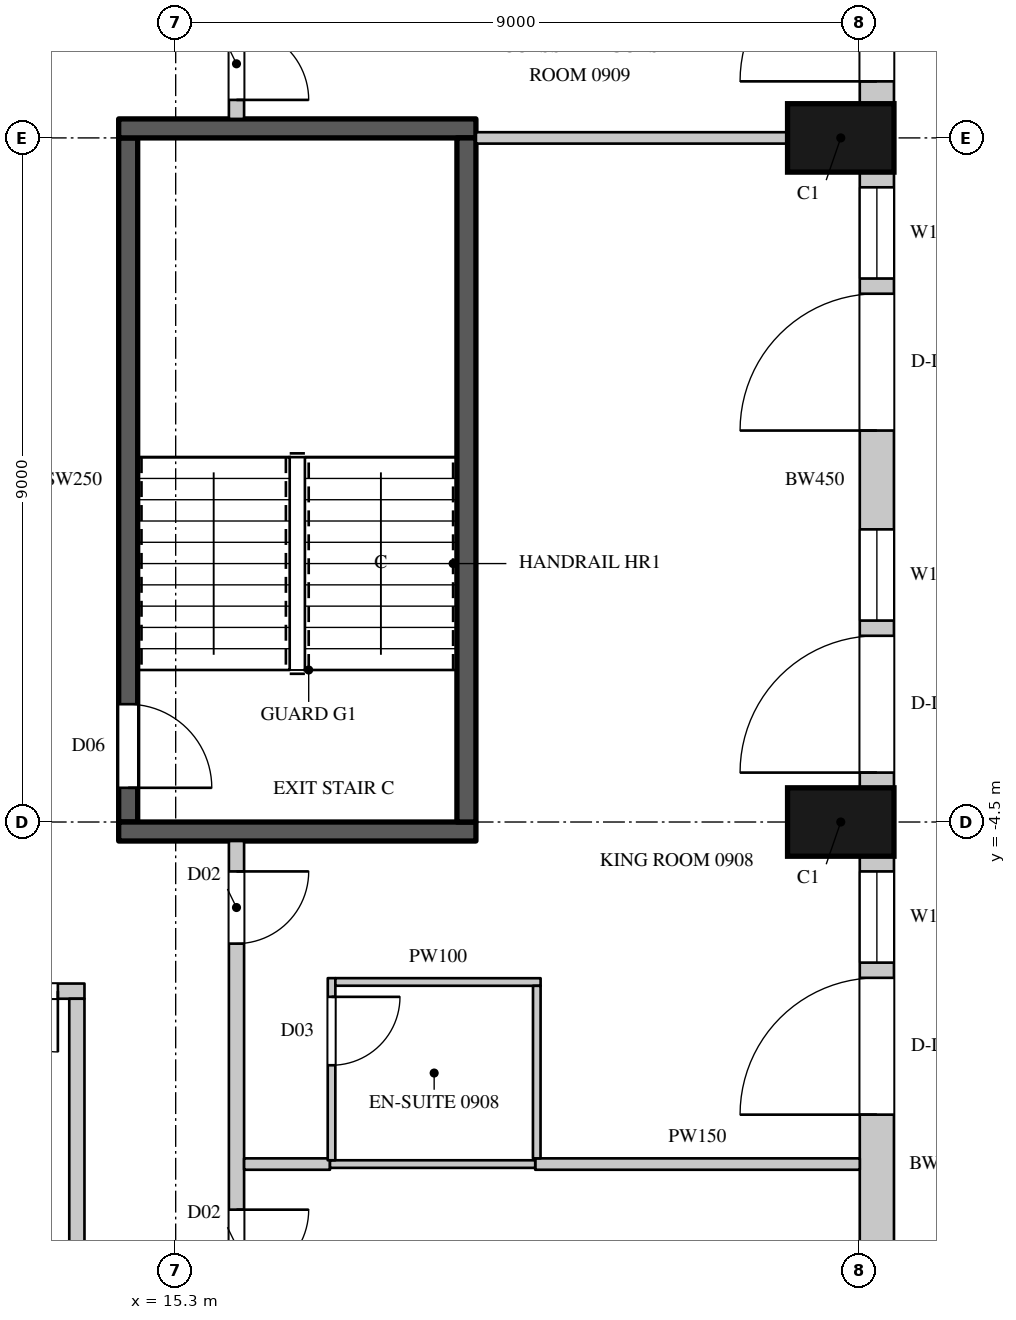
"""IFC4 building model, lengths in metres.
Left out: names, types, materials, properties, quantities, classifications, styles, units other than length and angle.
Written with IfcOpenShell. Run it as: python <this file> out.ifc"""

import sys

from ifc_helpers import new_model, si_unit, direction, frame, frame_2d, origin, origin_2d, place, context, subcontext, project, spatial, rectangle, extrude, element, fill, save


model = new_model("IFC4")
c1 = context("Model", 3, precision=1e-05, world=origin(), true_north=direction((0.0, 1.0)))
c2 = subcontext(c1, "Body", "Model", "MODEL_VIEW")
j1 = project(units=[si_unit("LENGTHUNIT", "METRE"), si_unit("PLANEANGLEUNIT", "RADIAN")], contexts=[c1])
p1 = place(None, origin())
s1 = spatial("IfcSite", under=j1, at=p1, CompositionType="ELEMENT")
p2 = place(p1, origin())
s2 = spatial("IfcBuilding", under=s1, at=p2, CompositionType="ELEMENT")
p3 = place(p2, frame((0.0, 0.0, 62.7)))
s3 = spatial("IfcBuildingStorey", under=s2, at=p3, CompositionType="ELEMENT", Elevation=62.7)
for number, where, z_axis, x_axis in (
    (1, (24.05, -4.5, 0.0), (0.0, 0.0, 1.0), (0.0, 1.0, 0.0)),
    (2, (24.05, 4.5, 0.0), (0.0, 0.0, 1.0), (0.0, 1.0, 0.0)),
):
    element("IfcColumn", number, at=place(p3, frame(where, z_axis=z_axis, x_axis=x_axis)), inside=s3, PredefinedType="COLUMN", context=c2, shape_type="SweptSolid", body=[
        extrude(rectangle(XDim=0.9, YDim=1.4, at=origin_2d()), origin(), (0.0, 0.0, 1.0), 3.6),
    ])
p4 = place(p3, frame((24.525, -13.05, 0.0), z_axis=(0.0, 0.0, 1.0), x_axis=(0.0, 1.0, 0.0)))
e3 = element("IfcWall", 3, at=p4, inside=s3, PredefinedType="SOLIDWALL", context=c2, shape_type="SweptSolid", body=[
    extrude(rectangle(XDim=8.1, YDim=0.45, at=frame_2d((4.05, 0.0))), origin(), (0.0, 0.0, 1.0), 3.3),
])
p5 = place(p4, frame((0.9, 0.0, 0.0)))
e4 = element("IfcOpeningElement", 4, at=p5, cuts=e3, PredefinedType="OPENING", context=c2, shape_type="SweptSolid", body=[
    extrude(rectangle(XDim=1.8, YDim=2.4, at=frame_2d((0.9, 1.2))), frame((0.0, 0.235, 0.0), z_axis=(0.0, -1.0, 0.0), x_axis=(1.0, 0.0, 0.0)), (0.0, 0.0, 1.0), 0.47),
])
p6 = place(p4, frame((4.7, 0.0, 0.0)))
e5 = element("IfcOpeningElement", 5, at=p6, cuts=e3, PredefinedType="OPENING", context=c2, shape_type="SweptSolid", body=[
    extrude(rectangle(XDim=1.8, YDim=2.4, at=frame_2d((0.9, 1.2))), frame((0.0, 0.235, 0.0), z_axis=(0.0, -1.0, 0.0), x_axis=(1.0, 0.0, 0.0)), (0.0, 0.0, 1.0), 0.47),
])
p7 = place(p4, frame((6.7, 0.0, 1.05)))
e6 = element("IfcOpeningElement", 6, at=p7, cuts=e3, PredefinedType="OPENING", context=c2, shape_type="SweptSolid", body=[
    extrude(rectangle(XDim=1.2, YDim=2.0, at=frame_2d((0.6, 1.0))), frame((0.0, 0.235, 0.0), z_axis=(0.0, -1.0, 0.0), x_axis=(1.0, 0.0, 0.0)), (0.0, 0.0, 1.0), 0.47),
])
p8 = place(p3, frame((24.525, -4.05, 0.0), z_axis=(0.0, 0.0, 1.0), x_axis=(0.0, 1.0, 0.0)))
e7 = element("IfcWall", 7, at=p8, inside=s3, PredefinedType="SOLIDWALL", context=c2, shape_type="SweptSolid", body=[
    extrude(rectangle(XDim=8.1, YDim=0.45, at=frame_2d((4.05, 0.0))), origin(), (0.0, 0.0, 1.0), 3.3),
])
p9 = place(p8, frame((0.2, 0.0, 0.0)))
e8 = element("IfcOpeningElement", 8, at=p9, cuts=e7, PredefinedType="OPENING", context=c2, shape_type="SweptSolid", body=[
    extrude(rectangle(XDim=1.8, YDim=2.4, at=frame_2d((0.9, 1.2))), frame((0.0, 0.235, 0.0), z_axis=(0.0, -1.0, 0.0), x_axis=(1.0, 0.0, 0.0)), (0.0, 0.0, 1.0), 0.47),
])
p10 = place(p8, frame((2.2, 0.0, 1.05)))
e9 = element("IfcOpeningElement", 9, at=p10, cuts=e7, PredefinedType="OPENING", context=c2, shape_type="SweptSolid", body=[
    extrude(rectangle(XDim=1.2, YDim=2.0, at=frame_2d((0.6, 1.0))), frame((0.0, 0.235, 0.0), z_axis=(0.0, -1.0, 0.0), x_axis=(1.0, 0.0, 0.0)), (0.0, 0.0, 1.0), 0.47),
])
p11 = place(p8, frame((4.7, 0.0, 0.0)))
e10 = element("IfcOpeningElement", 10, at=p11, cuts=e7, PredefinedType="OPENING", context=c2, shape_type="SweptSolid", body=[
    extrude(rectangle(XDim=1.8, YDim=2.4, at=frame_2d((0.9, 1.2))), frame((0.0, 0.235, 0.0), z_axis=(0.0, -1.0, 0.0), x_axis=(1.0, 0.0, 0.0)), (0.0, 0.0, 1.0), 0.47),
])
p12 = place(p8, frame((6.7, 0.0, 1.05)))
e11 = element("IfcOpeningElement", 11, at=p12, cuts=e7, PredefinedType="OPENING", context=c2, shape_type="SweptSolid", body=[
    extrude(rectangle(XDim=1.2, YDim=2.0, at=frame_2d((0.6, 1.0))), frame((0.0, 0.235, 0.0), z_axis=(0.0, -1.0, 0.0), x_axis=(1.0, 0.0, 0.0)), (0.0, 0.0, 1.0), 0.47),
])
p13 = place(p3, frame((24.525, 4.95, 0.0), z_axis=(0.0, 0.0, 1.0), x_axis=(0.0, 1.0, 0.0)))
e12 = element("IfcWall", 12, at=p13, inside=s3, PredefinedType="SOLIDWALL", context=c2, shape_type="SweptSolid", body=[
    extrude(rectangle(XDim=8.439, YDim=0.45, at=frame_2d((4.219, 0.0))), origin(), (0.0, 0.0, 1.0), 3.3),
])
p14 = place(p13, frame((0.294, 0.0, 0.0)))
e13 = element("IfcOpeningElement", 13, at=p14, cuts=e12, PredefinedType="OPENING", context=c2, shape_type="SweptSolid", body=[
    extrude(rectangle(XDim=1.8, YDim=2.4, at=frame_2d((0.9, 1.2))), frame((0.0, 0.235, 0.0), z_axis=(0.0, -1.0, 0.0), x_axis=(1.0, 0.0, 0.0)), (0.0, 0.0, 1.0), 0.47),
])
p15 = place(p13, frame((2.294, 0.0, 1.05)))
e14 = element("IfcOpeningElement", 14, at=p15, cuts=e12, PredefinedType="OPENING", context=c2, shape_type="SweptSolid", body=[
    extrude(rectangle(XDim=1.2, YDim=2.0, at=frame_2d((0.6, 1.0))), frame((0.0, 0.235, 0.0), z_axis=(0.0, -1.0, 0.0), x_axis=(1.0, 0.0, 0.0)), (0.0, 0.0, 1.0), 0.47),
])
p16 = place(p13, frame((5.232, 0.0, 1.05)))
e15 = element("IfcOpeningElement", 15, at=p16, cuts=e12, PredefinedType="OPENING", context=c2, shape_type="SweptSolid", body=[
    extrude(rectangle(XDim=2.7, YDim=2.0, at=frame_2d((1.35, 1.0))), frame((0.0, 0.235, 0.0), z_axis=(0.0, -1.0, 0.0), x_axis=(1.0, 0.0, 0.0)), (0.0, 0.0, 1.0), 0.47),
])
p17 = place(p3, frame((10.5, -6.725, 0.0), z_axis=(0.0, 0.0, 1.0), x_axis=(1.0, 0.0, 0.0)))
e16 = element("IfcWall", 16, at=p17, inside=s3, PredefinedType="PARTITIONING", context=c2, shape_type="SweptSolid", body=[
    extrude(rectangle(XDim=3.6, YDim=0.2, at=frame_2d((1.8, 0.0))), origin(), (0.0, 0.0, 1.0), 3.3),
])
p18 = place(p17, frame((1.65, 0.0, 0.0)))
e17 = element("IfcOpeningElement", 17, at=p18, cuts=e16, PredefinedType="OPENING", context=c2, shape_type="SweptSolid", body=[
    extrude(rectangle(XDim=1.6, YDim=2.4, at=frame_2d((0.8, 1.2))), frame((0.0, 0.11, 0.0), z_axis=(0.0, -1.0, 0.0), x_axis=(1.0, 0.0, 0.0)), (0.0, 0.0, 1.0), 0.22),
])
p19 = place(p3, frame((14.0, -15.3, 0.0), z_axis=(0.0, 0.0, 1.0), x_axis=(0.0, 1.0, 0.0)))
e18 = element("IfcWall", 18, at=p19, inside=s3, PredefinedType="PARTITIONING", context=c2, shape_type="SweptSolid", body=[
    extrude(rectangle(XDim=8.475, YDim=0.2, at=frame_2d((4.238, 0.0))), origin(), (0.0, 0.0, 1.0), 3.3),
])
p20 = place(p3, frame((16.1, -17.5, 0.0), z_axis=(0.0, 0.0, 1.0), x_axis=(0.0, 1.0, 0.0)))
e19 = element("IfcWall", 19, at=p20, inside=s3, PredefinedType="PARTITIONING", context=c2, shape_type="SweptSolid", body=[
    extrude(rectangle(XDim=12.75, YDim=0.2, at=frame_2d((6.375, 0.0))), origin(), (0.0, 0.0, 1.0), 3.3),
])
p21 = place(p20, frame((2.75, 0.0, 0.0)))
e20 = element("IfcOpeningElement", 20, at=p21, cuts=e19, PredefinedType="OPENING", context=c2, shape_type="SweptSolid", body=[
    extrude(rectangle(XDim=0.95, YDim=2.2, at=frame_2d((0.475, 1.1))), frame((0.0, 0.11, 0.0), z_axis=(0.0, -1.0, 0.0), x_axis=(1.0, 0.0, 0.0)), (0.0, 0.0, 1.0), 0.22),
])
p22 = place(p20, frame((6.95, 0.0, 0.0)))
e21 = element("IfcOpeningElement", 21, at=p22, cuts=e19, PredefinedType="OPENING", context=c2, shape_type="SweptSolid", body=[
    extrude(rectangle(XDim=0.95, YDim=2.2, at=frame_2d((0.475, 1.1))), frame((0.0, 0.11, 0.0), z_axis=(0.0, -1.0, 0.0), x_axis=(1.0, 0.0, 0.0)), (0.0, 0.0, 1.0), 0.22),
])
p23 = place(p20, frame((11.4, 0.0, 0.0)))
e22 = element("IfcOpeningElement", 22, at=p23, cuts=e19, PredefinedType="OPENING", context=c2, shape_type="SweptSolid", body=[
    extrude(rectangle(XDim=0.95, YDim=2.2, at=frame_2d((0.475, 1.1))), frame((0.0, 0.11, 0.0), z_axis=(0.0, -1.0, 0.0), x_axis=(1.0, 0.0, 0.0)), (0.0, 0.0, 1.0), 0.22),
])
p24 = place(p3, frame((16.1, 4.75, 0.0), z_axis=(0.0, 0.0, 1.0), x_axis=(0.0, 1.0, 0.0)))
e23 = element("IfcWall", 23, at=p24, inside=s3, PredefinedType="PARTITIONING", context=c2, shape_type="SweptSolid", body=[
    extrude(rectangle(XDim=12.65, YDim=0.2, at=frame_2d((6.325, 0.0))), origin(), (0.0, 0.0, 1.0), 3.3),
])
p25 = place(p24, frame((0.25, 0.0, 0.0)))
e24 = element("IfcOpeningElement", 24, at=p25, cuts=e23, PredefinedType="OPENING", context=c2, shape_type="SweptSolid", body=[
    extrude(rectangle(XDim=0.95, YDim=2.2, at=frame_2d((0.475, 1.1))), frame((0.0, 0.11, 0.0), z_axis=(0.0, -1.0, 0.0), x_axis=(1.0, 0.0, 0.0)), (0.0, 0.0, 1.0), 0.22),
])
p26 = place(p24, frame((6.9, 0.0, 0.0)))
e25 = element("IfcOpeningElement", 25, at=p26, cuts=e23, PredefinedType="OPENING", context=c2, shape_type="SweptSolid", body=[
    extrude(rectangle(XDim=0.95, YDim=2.2, at=frame_2d((0.475, 1.1))), frame((0.0, 0.11, 0.0), z_axis=(0.0, -1.0, 0.0), x_axis=(1.0, 0.0, 0.0)), (0.0, 0.0, 1.0), 0.22),
])
p27 = place(p3, frame((16.2, -9.0, 0.0), z_axis=(0.0, 0.0, 1.0), x_axis=(1.0, 0.0, 0.0)))
e26 = element("IfcWall", 26, at=p27, inside=s3, PredefinedType="PARTITIONING", context=c2, shape_type="SweptSolid", body=[
    extrude(rectangle(XDim=1.13, YDim=0.15, at=frame_2d((0.565, 0.0))), origin(), (0.0, 0.0, 1.0), 2.65),
])
p28 = place(p3, frame((19.25, 4.5, 0.0), z_axis=(0.0, 0.0, 1.0), x_axis=(1.0, 0.0, 0.0)))
e27 = element("IfcWall", 27, at=p28, inside=s3, PredefinedType="PARTITIONING", context=c2, shape_type="SweptSolid", body=[
    extrude(rectangle(XDim=4.1, YDim=0.15, at=frame_2d((2.05, 0.0))), origin(), (0.0, 0.0, 1.0), 3.3),
])
p29 = place(p3, frame((20.03, -9.0, 0.0), z_axis=(0.0, 0.0, 1.0), x_axis=(1.0, 0.0, 0.0)))
e28 = element("IfcWall", 28, at=p29, inside=s3, PredefinedType="PARTITIONING", context=c2, shape_type="SweptSolid", body=[
    extrude(rectangle(XDim=4.27, YDim=0.15, at=frame_2d((2.135, 0.0))), origin(), (0.0, 0.0, 1.0), 2.65),
])
p30 = place(p3, frame((14.675, -4.5, 0.0), z_axis=(0.0, 0.0, 1.0), x_axis=(0.0, 1.0, 0.0)))
e29 = element("IfcWall", 29, at=p30, inside=s3, PredefinedType="SHEAR", context=c2, shape_type="SweptSolid", body=[
    extrude(rectangle(XDim=9.0, YDim=0.25, at=frame_2d((4.5, 0.0))), origin(), (0.0, 0.0, 1.0), 3.3),
])
p31 = place(p30, frame((0.45, 0.0, 0.0)))
e30 = element("IfcOpeningElement", 30, at=p31, cuts=e29, PredefinedType="OPENING", context=c2, shape_type="SweptSolid", body=[
    extrude(rectangle(XDim=1.1, YDim=2.2, at=frame_2d((0.55, 1.1))), frame((0.0, 0.135, 0.0), z_axis=(0.0, -1.0, 0.0), x_axis=(1.0, 0.0, 0.0)), (0.0, 0.0, 1.0), 0.27),
])
for number, where, z_axis, x_axis in (
    (31, (14.55, -4.625, 0.0), (0.0, 0.0, 1.0), (1.0, 0.0, 0.0)),
    (32, (14.55, 4.625, 0.0), (0.0, 0.0, 1.0), (1.0, 0.0, 0.0)),
):
    element("IfcWall", number, at=place(p3, frame(where, z_axis=z_axis, x_axis=x_axis)), inside=s3, PredefinedType="SHEAR", context=c2, shape_type="SweptSolid", body=[
        extrude(rectangle(XDim=4.7, YDim=0.25, at=frame_2d((2.35, 0.0))), origin(), (0.0, 0.0, 1.0), 3.3),
    ])
p32 = place(p3, frame((19.125, -4.5, 0.0), z_axis=(0.0, 0.0, 1.0), x_axis=(0.0, 1.0, 0.0)))
e33 = element("IfcWall", 33, at=p32, inside=s3, PredefinedType="SHEAR", context=c2, shape_type="SweptSolid", body=[
    extrude(rectangle(XDim=9.0, YDim=0.25, at=frame_2d((4.5, 0.0))), origin(), (0.0, 0.0, 1.0), 3.3),
])
p33 = place(p3, frame((17.33, -9.0, 0.0), z_axis=(0.0, 0.0, 1.0), x_axis=(1.0, 0.0, 0.0)))
e34 = element("IfcWall", 34, at=p33, inside=s3, PredefinedType="PARTITIONING", context=c2, shape_type="SweptSolid", body=[
    extrude(rectangle(XDim=2.7, YDim=0.1, at=frame_2d((1.35, 0.0))), origin(), (0.0, 0.0, 1.0), 2.65),
])
p34 = place(p3, frame((17.35, -8.95, 0.0), z_axis=(0.0, 0.0, 1.0), x_axis=(0.000407580973, 0.999999916939, 0.0)))
e35 = element("IfcWall", 35, at=p34, inside=s3, PredefinedType="PARTITIONING", context=c2, shape_type="SweptSolid", body=[
    extrude(rectangle(XDim=2.396, YDim=0.1, at=frame_2d((1.198, 0.0))), origin(), (0.0, 0.0, 1.0), 3.3),
])
p35 = place(p34, frame((1.25, 0.0, 0.0)))
e36 = element("IfcOpeningElement", 36, at=p35, cuts=e35, PredefinedType="OPENING", context=c2, shape_type="SweptSolid", body=[
    extrude(rectangle(XDim=0.9, YDim=2.2, at=frame_2d((0.45, 1.1))), frame((0.0, 0.06, 0.0), z_axis=(0.0, -1.0, 0.0), x_axis=(1.0, 0.0, 0.0)), (0.0, 0.0, 1.0), 0.12),
])
p36 = place(p3, frame((17.401, -6.604, 0.0), z_axis=(0.0, 0.0, 1.0), x_axis=(0.9999999346, -0.000361663629, 0.0)))
e37 = element("IfcWall", 37, at=p36, inside=s3, PredefinedType="PARTITIONING", context=c2, shape_type="SweptSolid", body=[
    extrude(rectangle(XDim=2.7, YDim=0.1, at=frame_2d((1.35, 0.0))), origin(), (0.0, 0.0, 1.0), 3.3),
])
p37 = place(p3, frame((20.05, -8.925, 0.0), z_axis=(0.0, 0.0, 1.0), x_axis=(0.000430200003, 0.999999907464, 0.0)))
e38 = element("IfcWall", 38, at=p37, inside=s3, PredefinedType="PARTITIONING", context=c2, shape_type="SweptSolid", body=[
    extrude(rectangle(XDim=2.27, YDim=0.1, at=frame_2d((1.135, 0.0))), origin(), (0.0, 0.0, 1.0), 3.3),
])
p38 = place(p6, origin())
e39 = element("IfcDoor", 39, at=p38, inside=s3, OperationType="SLIDING_TO_LEFT", PredefinedType="DOOR", context=c2, shape_type="SweptSolid", body=[
    extrude(rectangle(XDim=1.8, YDim=2.4, at=frame_2d((0.9, 1.2))), frame((0.0, 0.13, 0.0), z_axis=(0.0, -1.0, 0.0), x_axis=(1.0, 0.0, 0.0)), (0.0, 0.0, 1.0), 0.05),
])
fill(e5, e39)
p39 = place(p7, origin())
e40 = element("IfcWindow", 40, at=p39, inside=s3, PartitioningType="SINGLE_PANEL", PredefinedType="WINDOW", context=c2, shape_type="SweptSolid", body=[
    extrude(rectangle(XDim=1.2, YDim=2.0, at=frame_2d((0.6, 1.0))), frame((0.0, 0.135, 0.0), z_axis=(0.0, -1.0, 0.0), x_axis=(1.0, 0.0, 0.0)), (0.0, 0.0, 1.0), 0.06),
])
fill(e6, e40)
p40 = place(p9, origin())
e41 = element("IfcDoor", 41, at=p40, inside=s3, OperationType="SLIDING_TO_LEFT", PredefinedType="DOOR", context=c2, shape_type="SweptSolid", body=[
    extrude(rectangle(XDim=1.8, YDim=2.4, at=frame_2d((0.9, 1.2))), frame((0.0, 0.13, 0.0), z_axis=(0.0, -1.0, 0.0), x_axis=(1.0, 0.0, 0.0)), (0.0, 0.0, 1.0), 0.05),
])
fill(e8, e41)
p41 = place(p10, origin())
e42 = element("IfcWindow", 42, at=p41, inside=s3, PartitioningType="SINGLE_PANEL", PredefinedType="WINDOW", context=c2, shape_type="SweptSolid", body=[
    extrude(rectangle(XDim=1.2, YDim=2.0, at=frame_2d((0.6, 1.0))), frame((0.0, 0.135, 0.0), z_axis=(0.0, -1.0, 0.0), x_axis=(1.0, 0.0, 0.0)), (0.0, 0.0, 1.0), 0.06),
])
fill(e9, e42)
p42 = place(p11, origin())
e43 = element("IfcDoor", 43, at=p42, inside=s3, OperationType="SLIDING_TO_LEFT", PredefinedType="DOOR", context=c2, shape_type="SweptSolid", body=[
    extrude(rectangle(XDim=1.8, YDim=2.4, at=frame_2d((0.9, 1.2))), frame((0.0, 0.13, 0.0), z_axis=(0.0, -1.0, 0.0), x_axis=(1.0, 0.0, 0.0)), (0.0, 0.0, 1.0), 0.05),
])
fill(e10, e43)
p43 = place(p12, origin())
e44 = element("IfcWindow", 44, at=p43, inside=s3, PartitioningType="SINGLE_PANEL", PredefinedType="WINDOW", context=c2, shape_type="SweptSolid", body=[
    extrude(rectangle(XDim=1.2, YDim=2.0, at=frame_2d((0.6, 1.0))), frame((0.0, 0.135, 0.0), z_axis=(0.0, -1.0, 0.0), x_axis=(1.0, 0.0, 0.0)), (0.0, 0.0, 1.0), 0.06),
])
fill(e11, e44)
p44 = place(p14, origin())
e45 = element("IfcDoor", 45, at=p44, inside=s3, OperationType="SLIDING_TO_LEFT", PredefinedType="DOOR", context=c2, shape_type="SweptSolid", body=[
    extrude(rectangle(XDim=1.8, YDim=2.4, at=frame_2d((0.9, 1.2))), frame((0.0, 0.13, 0.0), z_axis=(0.0, -1.0, 0.0), x_axis=(1.0, 0.0, 0.0)), (0.0, 0.0, 1.0), 0.05),
])
fill(e13, e45)
p45 = place(p18, origin())
e46 = element("IfcDoor", 46, at=p45, inside=s3, OperationType="DOUBLE_DOOR_SINGLE_SWING", PredefinedType="DOOR", context=c2, shape_type="SweptSolid", body=[
    extrude(rectangle(XDim=1.6, YDim=2.4, at=frame_2d((0.8, 1.2))), frame((0.0, 0.025, 0.0), z_axis=(0.0, -1.0, 0.0), x_axis=(1.0, 0.0, 0.0)), (0.0, 0.0, 1.0), 0.05),
])
fill(e17, e46)
p46 = place(p22, origin())
e47 = element("IfcDoor", 47, at=p46, inside=s3, OperationType="SINGLE_SWING_LEFT", PredefinedType="DOOR", context=c2, shape_type="SweptSolid", body=[
    extrude(rectangle(XDim=0.95, YDim=2.2, at=frame_2d((0.475, 1.1))), frame((0.0, 0.025, 0.0), z_axis=(0.0, -1.0, 0.0), x_axis=(1.0, 0.0, 0.0)), (0.0, 0.0, 1.0), 0.05),
])
fill(e21, e47)
p47 = place(p23, origin())
e48 = element("IfcDoor", 48, at=p47, inside=s3, OperationType="SINGLE_SWING_LEFT", PredefinedType="DOOR", context=c2, shape_type="SweptSolid", body=[
    extrude(rectangle(XDim=0.95, YDim=2.2, at=frame_2d((0.475, 1.1))), frame((0.0, 0.025, 0.0), z_axis=(0.0, -1.0, 0.0), x_axis=(1.0, 0.0, 0.0)), (0.0, 0.0, 1.0), 0.05),
])
fill(e22, e48)
p48 = place(p35, origin())
e49 = element("IfcDoor", 49, at=p48, inside=s3, OperationType="SINGLE_SWING_LEFT", PredefinedType="DOOR", context=c2, shape_type="SweptSolid", body=[
    extrude(rectangle(XDim=0.9, YDim=2.2, at=frame_2d((0.45, 1.1))), frame((0.0, 0.025, 0.0), z_axis=(0.0, -1.0, 0.0), x_axis=(1.0, 0.0, 0.0)), (0.0, 0.0, 1.0), 0.05),
])
fill(e36, e49)
p49 = place(p25, origin())
e50 = element("IfcDoor", 50, at=p49, inside=s3, OperationType="SINGLE_SWING_RIGHT", PredefinedType="DOOR", context=c2, shape_type="SweptSolid", body=[
    extrude(rectangle(XDim=0.95, YDim=2.2, at=frame_2d((0.475, 1.1))), frame((0.0, 0.025, 0.0), z_axis=(0.0, -1.0, 0.0), x_axis=(1.0, 0.0, 0.0)), (0.0, 0.0, 1.0), 0.05),
])
fill(e24, e50)
p50 = place(p31, origin())
e51 = element("IfcDoor", 51, at=p50, inside=s3, OperationType="SINGLE_SWING_RIGHT", PredefinedType="DOOR", context=c2, shape_type="SweptSolid", body=[
    extrude(rectangle(XDim=1.1, YDim=2.2, at=frame_2d((0.55, 1.1))), frame((0.0, 0.025, 0.0), z_axis=(0.0, -1.0, 0.0), x_axis=(1.0, 0.0, 0.0)), (0.0, 0.0, 1.0), 0.05),
])
fill(e30, e51)
save(model, sys.argv[1])
